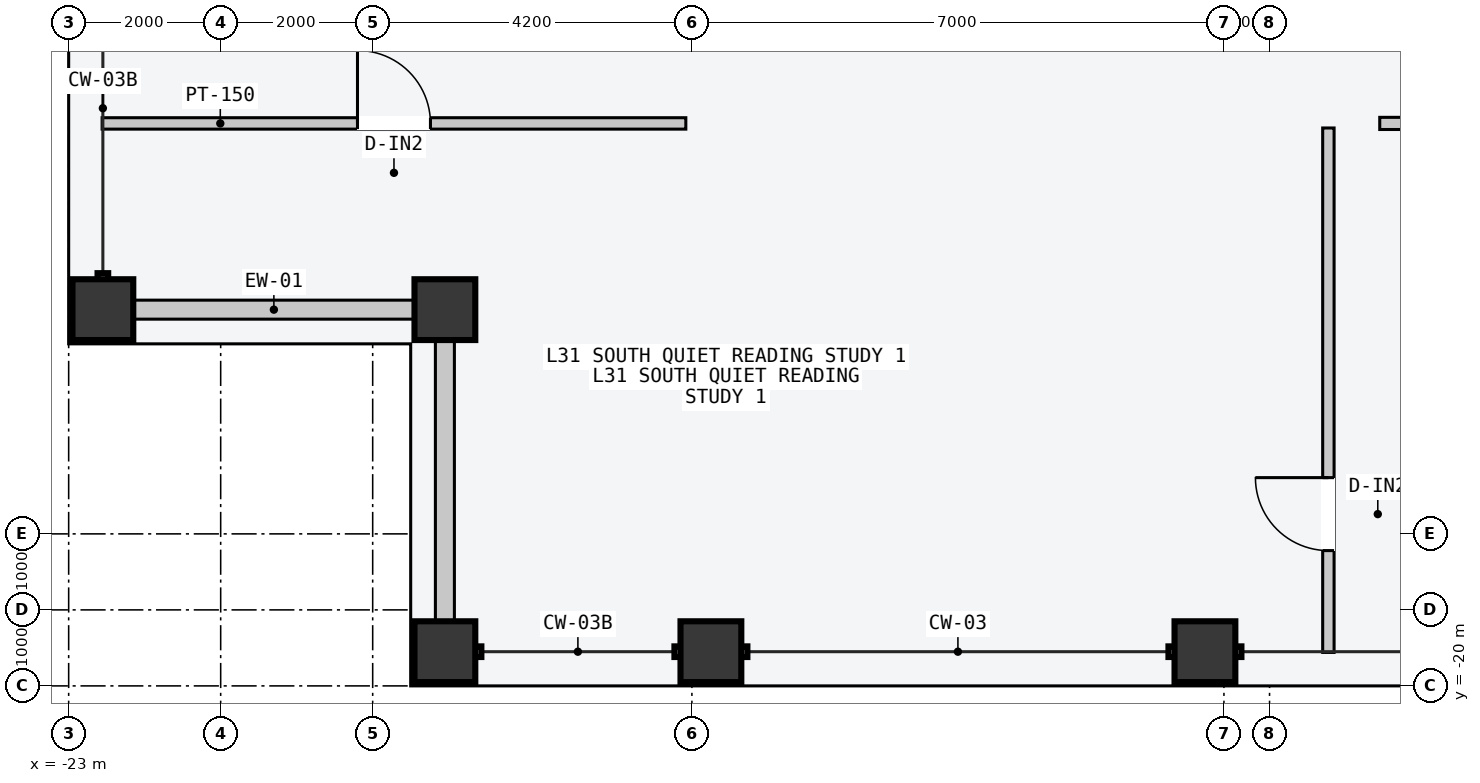
"""IFC4 building model, lengths in metres.
Left out: names, types, materials, properties, quantities, classifications, styles, units other than length and angle.
Written with IfcOpenShell. Run it as: python <this file> out.ifc"""

import sys

from ifc_helpers import new_model, si_unit, direction, frame, frame_2d, origin, origin_2d, place, context, subcontext, project, spatial, rectangle, hollow_rectangle, extrude, element, fill, save


model = new_model("IFC4")
c1 = context("Model", 3, precision=1e-05, world=origin(), true_north=direction((0.0, 1.0)))
c2 = subcontext(c1, "Body", "Model", "MODEL_VIEW")
j1 = project(units=[si_unit("LENGTHUNIT", "METRE"), si_unit("PLANEANGLEUNIT", "RADIAN")], contexts=[c1])
p1 = place(None, origin())
s1 = spatial("IfcSite", under=j1, at=p1, CompositionType="ELEMENT")
p2 = place(p1, origin())
s2 = spatial("IfcBuilding", under=s1, at=p2, CompositionType="ELEMENT")
p3 = place(p2, frame((0.0, 0.0, 120.6)))
s3 = spatial("IfcBuildingStorey", under=s2, at=p3, CompositionType="ELEMENT", Elevation=120.6)
for number, where, z_axis, x_axis in (
    (1, (-18.05, -19.55, 0.0), (0.0, 0.0, 1.0), (1.0, 0.0, 0.0)),
    (2, (-14.55, -19.55, 0.0), (0.0, 0.0, 1.0), (1.0, 0.0, 0.0)),
    (3, (-8.05, -19.55, 0.0), (0.0, 0.0, 1.0), (1.0, 0.0, 0.0)),
    (4, (-22.55, -15.05, 0.0), (0.0, 0.0, 1.0), (0.0, 1.0, 0.0)),
    (5, (-18.05, -15.05, 0.0), (0.0, 0.0, 1.0), (1.0, 0.0, 0.0)),
):
    element("IfcColumn", number, at=place(p3, frame(where, z_axis=z_axis, x_axis=x_axis)), inside=s3, PredefinedType="COLUMN", context=c2, shape_type="SweptSolid", body=[
        extrude(hollow_rectangle(XDim=0.8, YDim=0.8, WallThickness=0.036, at=origin_2d()), origin(), (0.0, 0.0, 1.0), 3.6),
    ])
for number, where, z_axis, x_axis in (
    (6, (-22.14, -15.05, 0.0), (0.0, 0.0, 1.0), (1.0, 0.0, 0.0)),
    (7, (-18.05, -19.14, 0.0), (0.0, 0.0, 1.0), (0.0, 1.0, 0.0)),
):
    element("IfcWall", number, at=place(p3, frame(where, z_axis=z_axis, x_axis=x_axis)), inside=s3, PredefinedType="STANDARD", context=c2, shape_type="SweptSolid", body=[
        extrude(rectangle(XDim=3.68, YDim=0.25, at=frame_2d((1.84, 0.0))), origin(), (0.0, 0.0, 1.0), 2.75),
    ])
p4 = place(p3, frame((-6.426, -19.56, 0.0), z_axis=(0.0, 0.0, 1.0), x_axis=(0.0, 1.0, 0.0)))
e8 = element("IfcWall", 8, at=p4, inside=s3, PredefinedType="PARTITIONING", context=c2, shape_type="SweptSolid", body=[
    extrude(rectangle(XDim=6.9, YDim=0.15, at=frame_2d((3.45, 0.0))), origin(), (0.0, 0.0, 1.0), 3.4),
])
p5 = place(p4, frame((1.34, 0.0, 0.0)))
e9 = element("IfcOpeningElement", 9, at=p5, cuts=e8, PredefinedType="OPENING", context=c2, shape_type="SweptSolid", body=[
    extrude(rectangle(XDim=0.96, YDim=2.18, at=frame_2d((0.48, 1.09))), frame((0.0, 0.085, 0.0), z_axis=(0.0, -1.0, 0.0), x_axis=(1.0, 0.0, 0.0)), (0.0, 0.0, 1.0), 0.17),
])
p6 = place(p3, frame((-5.75, -12.6, 0.0), z_axis=(0.0, 0.0, 1.0), x_axis=(1.0, 0.0, 0.0)))
e10 = element("IfcWall", 10, at=p6, inside=s3, PredefinedType="PARTITIONING", context=c2, shape_type="SweptSolid", body=[
    extrude(rectangle(XDim=11.5, YDim=0.16, at=frame_2d((5.75, 0.0))), origin(), (0.0, 0.0, 1.0), 3.4),
])
p7 = place(p6, frame((3.579, 0.0, 0.0)))
e11 = element("IfcOpeningElement", 11, at=p7, cuts=e10, PredefinedType="OPENING", context=c2, shape_type="SweptSolid", body=[
    extrude(rectangle(XDim=0.96, YDim=2.18, at=frame_2d((0.48, 1.09))), frame((0.0, 0.09, 0.0), z_axis=(0.0, -1.0, 0.0), x_axis=(1.0, 0.0, 0.0)), (0.0, 0.0, 1.0), 0.18),
])
p8 = place(p6, frame((9.299, 0.0, 0.0)))
e12 = element("IfcOpeningElement", 12, at=p8, cuts=e10, PredefinedType="OPENING", context=c2, shape_type="SweptSolid", body=[
    extrude(rectangle(XDim=1.02, YDim=2.2, at=frame_2d((0.51, 1.1))), frame((0.0, 0.09, 0.0), z_axis=(0.0, -1.0, 0.0), x_axis=(1.0, 0.0, 0.0)), (0.0, 0.0, 1.0), 0.18),
])
p9 = place(p3, frame((-22.56, -12.6, 0.0), z_axis=(0.0, 0.0, 1.0), x_axis=(1.0, 0.0, 0.0)))
e13 = element("IfcWall", 13, at=p9, inside=s3, PredefinedType="PARTITIONING", context=c2, shape_type="SweptSolid", body=[
    extrude(rectangle(XDim=7.68, YDim=0.15, at=frame_2d((3.84, 0.0))), origin(), (0.0, 0.0, 1.0), 3.4),
])
p10 = place(p9, frame((3.36, 0.0, 0.0)))
e14 = element("IfcOpeningElement", 14, at=p10, cuts=e13, PredefinedType="OPENING", context=c2, shape_type="SweptSolid", body=[
    extrude(rectangle(XDim=0.96, YDim=2.18, at=frame_2d((0.48, 1.09))), frame((0.0, 0.085, 0.0), z_axis=(0.0, -1.0, 0.0), x_axis=(1.0, 0.0, 0.0)), (0.0, 0.0, 1.0), 0.17),
])
p11 = place(p5, origin())
e15 = element("IfcDoor", 15, at=p11, inside=s3, OperationType="SINGLE_SWING_RIGHT", PredefinedType="DOOR", context=c2, shape_type="SweptSolid", body=[
    extrude(rectangle(XDim=0.96, YDim=2.18, at=frame_2d((0.48, 1.09))), frame((0.0, 0.025, 0.0), z_axis=(0.0, -1.0, 0.0), x_axis=(1.0, 0.0, 0.0)), (0.0, 0.0, 1.0), 0.05),
])
fill(e9, e15)
p12 = place(p10, origin())
e16 = element("IfcDoor", 16, at=p12, inside=s3, OperationType="SINGLE_SWING_LEFT", PredefinedType="DOOR", context=c2, shape_type="SweptSolid", body=[
    extrude(rectangle(XDim=0.96, YDim=2.18, at=frame_2d((0.48, 1.09))), frame((0.0, 0.025, 0.0), z_axis=(0.0, -1.0, 0.0), x_axis=(1.0, 0.0, 0.0)), (0.0, 0.0, 1.0), 0.05),
])
fill(e14, e16)
save(model, sys.argv[1])
